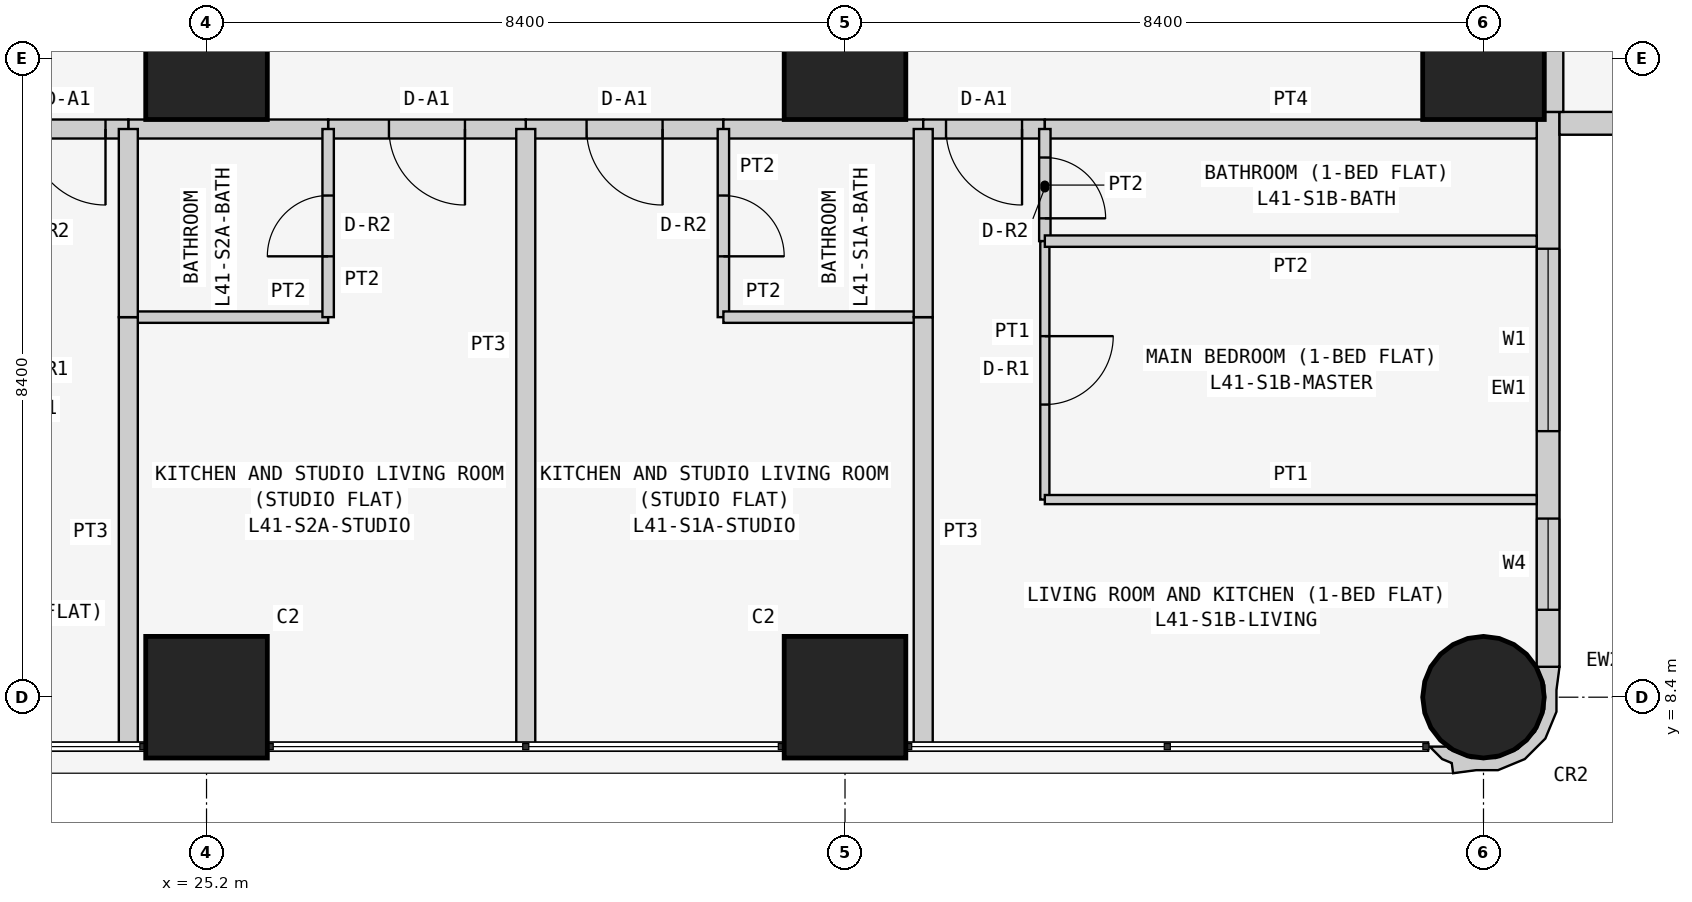
"""IFC4 building model, lengths in metres.
Left out: names, types, materials, properties, quantities, classifications, styles, units other than length and angle.
Written with IfcOpenShell. Run it as: python <this file> out.ifc"""

import sys

from ifc_helpers import new_model, si_unit, direction, frame, frame_2d, origin, origin_2d, place, context, subcontext, project, spatial, polyline, rectangle, circle, outline, extrude, element, fill, save


model = new_model("IFC4")
c1 = context("Model", 3, precision=1e-05, world=origin(), true_north=direction((0.0, 1.0)))
c2 = subcontext(c1, "Body", "Model", "MODEL_VIEW")
j1 = project(units=[si_unit("LENGTHUNIT", "METRE"), si_unit("PLANEANGLEUNIT", "RADIAN")], contexts=[c1])
p1 = place(None, origin())
s1 = spatial("IfcSite", under=j1, at=p1, CompositionType="ELEMENT")
p2 = place(p1, origin())
s2 = spatial("IfcBuilding", under=s1, at=p2, CompositionType="ELEMENT")
p3 = place(p2, frame((0.0, 0.0, 159.3)))
s3 = spatial("IfcBuildingStorey", under=s2, at=p3, CompositionType="ELEMENT", Elevation=159.3)
for number, where, z_axis, x_axis in (
    (1, (25.2, 8.4, 0.0), (0.0, 0.0, 1.0), (1.0, 0.0, 0.0)),
    (2, (25.2, 16.8, 0.0), (0.0, 0.0, 1.0), (1.0, 0.0, 0.0)),
    (3, (33.6, 8.4, 0.0), (0.0, 0.0, 1.0), (1.0, 0.0, 0.0)),
    (4, (33.6, 16.8, 0.0), (0.0, 0.0, 1.0), (1.0, 0.0, 0.0)),
):
    element("IfcColumn", number, at=place(p3, frame(where, z_axis=z_axis, x_axis=x_axis)), inside=s3, PredefinedType="COLUMN", context=c2, shape_type="SweptSolid", body=[
        extrude(rectangle(XDim=1.6, YDim=1.6, at=origin_2d()), origin(), (0.0, 0.0, 1.0), 3.6),
    ])
p4 = place(p3, frame((42.0, 8.4, 0.0), z_axis=(0.0, 0.0, 1.0), x_axis=(1.0, 0.0, 0.0)))
e5 = element("IfcColumn", 5, at=p4, inside=s3, PredefinedType="COLUMN", context=c2, shape_type="SweptSolid", body=[
    extrude(circle(Radius=0.8, at=origin_2d()), origin(), (0.0, 0.0, 1.0), 3.6),
])
p5 = place(p3, frame((42.0, 16.8, 0.0), z_axis=(0.0, 0.0, 1.0), x_axis=(1.0, 0.0, 0.0)))
e6 = element("IfcColumn", 6, at=p5, inside=s3, PredefinedType="COLUMN", context=c2, shape_type="SweptSolid", body=[
    extrude(rectangle(XDim=1.6, YDim=1.6, at=origin_2d()), origin(), (0.0, 0.0, 1.0), 3.6),
])
p6 = place(p3, frame((42.85, 8.8, 0.0), z_axis=(0.0, 0.0, 1.0), x_axis=(0.0, 1.0, 0.0)))
e7 = element("IfcWall", 7, at=p6, inside=s3, PredefinedType="SOLIDWALL", context=c2, shape_type="SweptSolid", body=[
    extrude(rectangle(XDim=7.3, YDim=0.3, at=frame_2d((3.65, 0.0))), origin(), (0.0, 0.0, 1.0), 3.45),
])
p7 = place(p6, frame((3.1, 0.0, 0.9)))
e8 = element("IfcOpeningElement", 8, at=p7, cuts=e7, PredefinedType="OPENING", context=c2, shape_type="SweptSolid", body=[
    extrude(rectangle(XDim=2.4, YDim=1.5, at=frame_2d((1.2, 0.75))), frame((0.0, 0.16, 0.0), z_axis=(0.0, -1.0, 0.0), x_axis=(1.0, 0.0, 0.0)), (0.0, 0.0, 1.0), 0.32),
])
p8 = place(p6, frame((0.75, 0.0, 0.9)))
e9 = element("IfcOpeningElement", 9, at=p8, cuts=e7, PredefinedType="OPENING", context=c2, shape_type="SweptSolid", body=[
    extrude(rectangle(XDim=1.2, YDim=1.5, at=frame_2d((0.6, 0.75))), frame((0.0, 0.16, 0.0), z_axis=(0.0, -1.0, 0.0), x_axis=(1.0, 0.0, 0.0)), (0.0, 0.0, 1.0), 0.32),
])
p9 = place(p3, frame((43.0, 15.95, 0.0), z_axis=(0.0, 0.0, 1.0), x_axis=(1.0, 0.0, 0.0)))
e10 = element("IfcWall", 10, at=p9, inside=s3, PredefinedType="SOLIDWALL", context=c2, shape_type="SweptSolid", body=[
    extrude(rectangle(XDim=15.4, YDim=0.3, at=frame_2d((7.7, 0.0))), origin(), (0.0, 0.0, 1.0), 3.45),
])
p10 = place(p9, frame((1.2, 0.0, 0.9)))
e11 = element("IfcOpeningElement", 11, at=p10, cuts=e10, PredefinedType="OPENING", context=c2, shape_type="SweptSolid", body=[
    extrude(rectangle(XDim=1.8, YDim=1.5, at=frame_2d((0.9, 0.75))), frame((0.0, 0.16, 0.0), z_axis=(0.0, -1.0, 0.0), x_axis=(1.0, 0.0, 0.0)), (0.0, 0.0, 1.0), 0.32),
])
p11 = place(p9, frame((4.95, 0.0, 1.5)))
e12 = element("IfcOpeningElement", 12, at=p11, cuts=e10, PredefinedType="OPENING", context=c2, shape_type="SweptSolid", body=[
    extrude(rectangle(XDim=0.9, YDim=0.7, at=frame_2d((0.45, 0.35))), frame((0.0, 0.16, 0.0), z_axis=(0.0, -1.0, 0.0), x_axis=(1.0, 0.0, 0.0)), (0.0, 0.0, 1.0), 0.32),
])
p12 = place(p9, frame((8.5, 0.0, 0.9)))
e13 = element("IfcOpeningElement", 13, at=p12, cuts=e10, PredefinedType="OPENING", context=c2, shape_type="SweptSolid", body=[
    extrude(rectangle(XDim=1.8, YDim=1.5, at=frame_2d((0.9, 0.75))), frame((0.0, 0.16, 0.0), z_axis=(0.0, -1.0, 0.0), x_axis=(1.0, 0.0, 0.0)), (0.0, 0.0, 1.0), 0.32),
])
p13 = place(p9, frame((12.5, 0.0, 0.0)))
e14 = element("IfcOpeningElement", 14, at=p13, cuts=e10, PredefinedType="OPENING", context=c2, shape_type="SweptSolid", body=[
    extrude(rectangle(XDim=0.9, YDim=2.4, at=frame_2d((0.45, 1.2))), frame((0.0, 0.16, 0.0), z_axis=(0.0, -1.0, 0.0), x_axis=(1.0, 0.0, 0.0)), (0.0, 0.0, 1.0), 0.32),
])
p14 = place(p9, frame((13.5, 0.0, 0.9)))
e15 = element("IfcOpeningElement", 15, at=p14, cuts=e10, PredefinedType="OPENING", context=c2, shape_type="SweptSolid", body=[
    extrude(rectangle(XDim=1.2, YDim=1.5, at=frame_2d((0.6, 0.75))), frame((0.0, 0.16, 0.0), z_axis=(0.0, -1.0, 0.0), x_axis=(1.0, 0.0, 0.0)), (0.0, 0.0, 1.0), 0.32),
])
p15 = place(p3, frame((41.352, 7.805, 0.0), z_axis=(0.0, 0.0, 1.0), x_axis=(0.343276641956, -0.93923434088, 0.0)))
e16 = element("IfcWall", 16, at=p15, inside=s3, PredefinedType="SOLIDWALL", context=c2, shape_type="SweptSolid", body=[
    extrude(outline(polyline([(-0.369, 1.89), (-0.509, 1.621), (-0.49, 1.615), (-0.479, 1.609), (-0.211, 1.62), (0.088, 1.511), (0.323, 1.295), (0.457, 1.006), (0.47, 0.688), (0.361, 0.389), (0.145, 0.154), (0.108, 0.136), (0.031, -0.075), (0.241, 0.023), (0.333, 0.124), (0.465, 0.094), (0.532, 0.393), (0.631, 0.663), (0.614, 1.044), (0.453, 1.391), (0.172, 1.649), (-0.097, 1.748), (-0.369, 1.89)])), origin(), (0.0, 0.0, 1.0), 3.45),
])
p16 = place(p3, frame((42.925, 22.571, 0.0), z_axis=(0.0, 0.0, 1.0), x_axis=(0.0, -1.0, 0.0)))
e17 = element("IfcWall", 17, at=p16, inside=s3, PredefinedType="PARTITIONING", context=c2, shape_type="SweptSolid", body=[
    extrude(rectangle(XDim=6.471, YDim=0.25, at=frame_2d((3.235, 0.0))), origin(), (0.0, 0.0, 1.0), 3.45),
])
p17 = place(p3, frame((32.0, 15.875, 0.0), z_axis=(0.0, 0.0, 1.0), x_axis=(-1.0, 0.0, 0.0)))
e18 = element("IfcWall", 18, at=p17, inside=s3, PredefinedType="PARTITIONING", context=c2, shape_type="SweptSolid", body=[
    extrude(rectangle(XDim=2.6, YDim=0.25, at=frame_2d((1.3, 0.0))), origin(), (0.0, 0.0, 1.0), 3.45),
])
p18 = place(p17, frame((0.8, 0.0, 0.0)))
e19 = element("IfcOpeningElement", 19, at=p18, cuts=e18, PredefinedType="OPENING", context=c2, shape_type="SweptSolid", body=[
    extrude(rectangle(XDim=1.0, YDim=2.1, at=frame_2d((0.5, 1.05))), frame((0.0, 0.135, 0.0), z_axis=(0.0, -1.0, 0.0), x_axis=(1.0, 0.0, 0.0)), (0.0, 0.0, 1.0), 0.27),
])
p19 = place(p3, frame((34.629, 15.875, 0.0), z_axis=(0.0, 0.0, 1.0), x_axis=(-1.0, 0.0, 0.0)))
e20 = element("IfcWall", 20, at=p19, inside=s3, PredefinedType="PARTITIONING", context=c2, shape_type="SweptSolid", body=[
    extrude(rectangle(XDim=2.629, YDim=0.25, at=frame_2d((1.314, 0.0))), origin(), (0.0, 0.0, 1.0), 3.45),
])
p20 = place(p3, frame((36.229, 15.875, 0.0), z_axis=(0.0, 0.0, 1.0), x_axis=(-1.0, 0.0, 0.0)))
e21 = element("IfcWall", 21, at=p20, inside=s3, PredefinedType="PARTITIONING", context=c2, shape_type="SweptSolid", body=[
    extrude(rectangle(XDim=1.6, YDim=0.25, at=frame_2d((0.8, 0.0))), origin(), (0.0, 0.0, 1.0), 3.45),
])
p21 = place(p20, frame((0.3, 0.0, 0.0)))
e22 = element("IfcOpeningElement", 22, at=p21, cuts=e21, PredefinedType="OPENING", context=c2, shape_type="SweptSolid", body=[
    extrude(rectangle(XDim=1.0, YDim=2.1, at=frame_2d((0.5, 1.05))), frame((0.0, 0.135, 0.0), z_axis=(0.0, -1.0, 0.0), x_axis=(1.0, 0.0, 0.0)), (0.0, 0.0, 1.0), 0.27),
])
p22 = place(p3, frame((42.7, 15.875, 0.0), z_axis=(0.0, 0.0, 1.0), x_axis=(-1.0, 0.0, 0.0)))
e23 = element("IfcWall", 23, at=p22, inside=s3, PredefinedType="PARTITIONING", context=c2, shape_type="SweptSolid", body=[
    extrude(rectangle(XDim=6.471, YDim=0.25, at=frame_2d((3.235, 0.0))), origin(), (0.0, 0.0, 1.0), 3.45),
])
p23 = place(p3, frame((29.4, 15.875, 0.0), z_axis=(0.0, 0.0, 1.0), x_axis=(-1.0, 0.0, 0.0)))
e24 = element("IfcWall", 24, at=p23, inside=s3, PredefinedType="PARTITIONING", context=c2, shape_type="SweptSolid", body=[
    extrude(rectangle(XDim=2.6, YDim=0.25, at=frame_2d((1.3, 0.0))), origin(), (0.0, 0.0, 1.0), 3.45),
])
p24 = place(p23, frame((0.8, 0.0, 0.0)))
e25 = element("IfcOpeningElement", 25, at=p24, cuts=e24, PredefinedType="OPENING", context=c2, shape_type="SweptSolid", body=[
    extrude(rectangle(XDim=1.0, YDim=2.1, at=frame_2d((0.5, 1.05))), frame((0.0, 0.135, 0.0), z_axis=(0.0, -1.0, 0.0), x_axis=(1.0, 0.0, 0.0)), (0.0, 0.0, 1.0), 0.27),
])
p25 = place(p3, frame((26.8, 15.875, 0.0), z_axis=(0.0, 0.0, 1.0), x_axis=(-1.0, 0.0, 0.0)))
e26 = element("IfcWall", 26, at=p25, inside=s3, PredefinedType="PARTITIONING", context=c2, shape_type="SweptSolid", body=[
    extrude(rectangle(XDim=2.629, YDim=0.25, at=frame_2d((1.314, 0.0))), origin(), (0.0, 0.0, 1.0), 3.45),
])
p26 = place(p3, frame((24.171, 15.875, 0.0), z_axis=(0.0, 0.0, 1.0), x_axis=(-1.0, 0.0, 0.0)))
e27 = element("IfcWall", 27, at=p26, inside=s3, PredefinedType="PARTITIONING", context=c2, shape_type="SweptSolid", body=[
    extrude(rectangle(XDim=1.6, YDim=0.25, at=frame_2d((0.8, 0.0))), origin(), (0.0, 0.0, 1.0), 3.45),
])
p27 = place(p26, frame((0.3, 0.0, 0.0)))
e28 = element("IfcOpeningElement", 28, at=p27, cuts=e27, PredefinedType="OPENING", context=c2, shape_type="SweptSolid", body=[
    extrude(rectangle(XDim=1.0, YDim=2.1, at=frame_2d((0.5, 1.05))), frame((0.0, 0.135, 0.0), z_axis=(0.0, -1.0, 0.0), x_axis=(1.0, 0.0, 0.0)), (0.0, 0.0, 1.0), 0.27),
])
p28 = place(p3, frame((32.0, 15.875, 0.0), z_axis=(0.0, 0.0, 1.0), x_axis=(0.0, -1.0, 0.0)))
e29 = element("IfcWall", 29, at=p28, inside=s3, PredefinedType="PARTITIONING", context=c2, shape_type="SweptSolid", body=[
    extrude(rectangle(XDim=2.475, YDim=0.15, at=frame_2d((1.238, 0.0))), origin(), (0.0, 0.0, 1.0), 3.45),
])
p29 = place(p28, frame((0.875, 0.0, 0.0)))
e30 = element("IfcOpeningElement", 30, at=p29, cuts=e29, PredefinedType="OPENING", context=c2, shape_type="SweptSolid", body=[
    extrude(rectangle(XDim=0.8, YDim=2.1, at=frame_2d((0.4, 1.05))), frame((0.0, 0.085, 0.0), z_axis=(0.0, -1.0, 0.0), x_axis=(1.0, 0.0, 0.0)), (0.0, 0.0, 1.0), 0.17),
])
p30 = place(p3, frame((32.0, 13.4, 0.0), z_axis=(0.0, 0.0, 1.0), x_axis=(1.0, 0.0, 0.0)))
e31 = element("IfcWall", 31, at=p30, inside=s3, PredefinedType="PARTITIONING", context=c2, shape_type="SweptSolid", body=[
    extrude(rectangle(XDim=2.629, YDim=0.15, at=frame_2d((1.314, 0.0))), origin(), (0.0, 0.0, 1.0), 3.45),
])
p31 = place(p3, frame((34.629, 13.4, 0.0), z_axis=(0.0, 0.0, 1.0), x_axis=(0.0, -1.0, 0.0)))
e32 = element("IfcWall", 32, at=p31, inside=s3, PredefinedType="PARTITIONING", context=c2, shape_type="SweptSolid", body=[
    extrude(rectangle(XDim=5.65, YDim=0.25, at=frame_2d((2.825, 0.0))), origin(), (0.0, 0.0, 1.0), 3.45),
])
p32 = place(p3, frame((29.4, 7.75, 0.0), z_axis=(0.0, 0.0, 1.0), x_axis=(0.0, 1.0, 0.0)))
e33 = element("IfcWall", 33, at=p32, inside=s3, PredefinedType="PARTITIONING", context=c2, shape_type="SweptSolid", body=[
    extrude(rectangle(XDim=8.125, YDim=0.25, at=frame_2d((4.062, 0.0))), origin(), (0.0, 0.0, 1.0), 2.848),
])
p33 = place(p3, frame((34.629, 13.4, 0.0), z_axis=(0.0, 0.0, 1.0), x_axis=(0.0, 1.0, 0.0)))
e34 = element("IfcWall", 34, at=p33, inside=s3, PredefinedType="PARTITIONING", context=c2, shape_type="SweptSolid", body=[
    extrude(rectangle(XDim=2.475, YDim=0.25, at=frame_2d((1.238, 0.0))), origin(), (0.0, 0.0, 1.0), 3.45),
])
p34 = place(p3, frame((36.229, 15.875, 0.0), z_axis=(0.0, 0.0, 1.0), x_axis=(0.0, -1.0, 0.0)))
e35 = element("IfcWall", 35, at=p34, inside=s3, PredefinedType="PARTITIONING", context=c2, shape_type="SweptSolid", body=[
    extrude(rectangle(XDim=1.475, YDim=0.15, at=frame_2d((0.738, 0.0))), origin(), (0.0, 0.0, 1.0), 3.45),
])
p35 = place(p34, frame((0.375, 0.0, 0.0)))
e36 = element("IfcOpeningElement", 36, at=p35, cuts=e35, PredefinedType="OPENING", context=c2, shape_type="SweptSolid", body=[
    extrude(rectangle(XDim=0.8, YDim=2.1, at=frame_2d((0.4, 1.05))), frame((0.0, 0.085, 0.0), z_axis=(0.0, -1.0, 0.0), x_axis=(1.0, 0.0, 0.0)), (0.0, 0.0, 1.0), 0.17),
])
p36 = place(p3, frame((36.229, 14.4, 0.0), z_axis=(0.0, 0.0, 1.0), x_axis=(0.0, -1.0, 0.0)))
e37 = element("IfcWall", 37, at=p36, inside=s3, PredefinedType="PARTITIONING", context=c2, shape_type="SweptSolid", body=[
    extrude(rectangle(XDim=3.4, YDim=0.12, at=frame_2d((1.7, 0.0))), origin(), (0.0, 0.0, 1.0), 3.45),
])
p37 = place(p36, frame((1.25, 0.0, 0.0)))
e38 = element("IfcOpeningElement", 38, at=p37, cuts=e37, PredefinedType="OPENING", context=c2, shape_type="SweptSolid", body=[
    extrude(rectangle(XDim=0.9, YDim=2.1, at=frame_2d((0.45, 1.05))), frame((0.0, 0.07, 0.0), z_axis=(0.0, -1.0, 0.0), x_axis=(1.0, 0.0, 0.0)), (0.0, 0.0, 1.0), 0.14),
])
p38 = place(p3, frame((36.229, 11.0, 0.0), z_axis=(0.0, 0.0, 1.0), x_axis=(1.0, 0.0, 0.0)))
e39 = element("IfcWall", 39, at=p38, inside=s3, PredefinedType="PARTITIONING", context=c2, shape_type="SweptSolid", body=[
    extrude(rectangle(XDim=6.471, YDim=0.12, at=frame_2d((3.235, 0.0))), origin(), (0.0, 0.0, 1.0), 3.45),
])
p39 = place(p3, frame((36.229, 14.4, 0.0), z_axis=(0.0, 0.0, 1.0), x_axis=(1.0, 0.0, 0.0)))
e40 = element("IfcWall", 40, at=p39, inside=s3, PredefinedType="PARTITIONING", context=c2, shape_type="SweptSolid", body=[
    extrude(rectangle(XDim=6.471, YDim=0.15, at=frame_2d((3.235, 0.0))), origin(), (0.0, 0.0, 1.0), 3.45),
])
p40 = place(p3, frame((24.171, 13.4, 0.0), z_axis=(0.0, 0.0, 1.0), x_axis=(1.0, 0.0, 0.0)))
e41 = element("IfcWall", 41, at=p40, inside=s3, PredefinedType="PARTITIONING", context=c2, shape_type="SweptSolid", body=[
    extrude(rectangle(XDim=2.629, YDim=0.15, at=frame_2d((1.314, 0.0))), origin(), (0.0, 0.0, 1.0), 3.45),
])
p41 = place(p3, frame((26.8, 13.4, 0.0), z_axis=(0.0, 0.0, 1.0), x_axis=(0.0, 1.0, 0.0)))
e42 = element("IfcWall", 42, at=p41, inside=s3, PredefinedType="PARTITIONING", context=c2, shape_type="SweptSolid", body=[
    extrude(rectangle(XDim=2.475, YDim=0.15, at=frame_2d((1.238, 0.0))), origin(), (0.0, 0.0, 1.0), 3.45),
])
p42 = place(p41, frame((0.8, 0.0, 0.0)))
e43 = element("IfcOpeningElement", 43, at=p42, cuts=e42, PredefinedType="OPENING", context=c2, shape_type="SweptSolid", body=[
    extrude(rectangle(XDim=0.8, YDim=2.1, at=frame_2d((0.4, 1.05))), frame((0.0, 0.085, 0.0), z_axis=(0.0, -1.0, 0.0), x_axis=(1.0, 0.0, 0.0)), (0.0, 0.0, 1.0), 0.17),
])
p43 = place(p3, frame((24.171, 7.75, 0.0), z_axis=(0.0, 0.0, 1.0), x_axis=(0.0, 1.0, 0.0)))
e44 = element("IfcWall", 44, at=p43, inside=s3, PredefinedType="PARTITIONING", context=c2, shape_type="SweptSolid", body=[
    extrude(rectangle(XDim=5.65, YDim=0.25, at=frame_2d((2.825, 0.0))), origin(), (0.0, 0.0, 1.0), 3.45),
])
p44 = place(p3, frame((24.171, 13.4, 0.0), z_axis=(0.0, 0.0, 1.0), x_axis=(0.0, 1.0, 0.0)))
e45 = element("IfcWall", 45, at=p44, inside=s3, PredefinedType="PARTITIONING", context=c2, shape_type="SweptSolid", body=[
    extrude(rectangle(XDim=2.475, YDim=0.25, at=frame_2d((1.238, 0.0))), origin(), (0.0, 0.0, 1.0), 3.45),
])
p45 = place(p7, origin())
e46 = element("IfcWindow", 46, at=p45, inside=s3, PartitioningType="SINGLE_PANEL", PredefinedType="WINDOW", context=c2, shape_type="SweptSolid", body=[
    extrude(rectangle(XDim=2.4, YDim=1.5, at=frame_2d((1.2, 0.75))), frame((0.0, 0.03, 0.0), z_axis=(0.0, -1.0, 0.0), x_axis=(1.0, 0.0, 0.0)), (0.0, 0.0, 1.0), 0.06),
])
fill(e8, e46)
p46 = place(p8, origin())
e47 = element("IfcWindow", 47, at=p46, inside=s3, PartitioningType="SINGLE_PANEL", PredefinedType="WINDOW", context=c2, shape_type="SweptSolid", body=[
    extrude(rectangle(XDim=1.2, YDim=1.5, at=frame_2d((0.6, 0.75))), frame((0.0, 0.03, 0.0), z_axis=(0.0, -1.0, 0.0), x_axis=(1.0, 0.0, 0.0)), (0.0, 0.0, 1.0), 0.06),
])
fill(e9, e47)
p47 = place(p18, origin())
e48 = element("IfcDoor", 48, at=p47, inside=s3, OperationType="SINGLE_SWING_LEFT", PredefinedType="DOOR", context=c2, shape_type="SweptSolid", body=[
    extrude(rectangle(XDim=1.0, YDim=2.1, at=frame_2d((0.5, 1.05))), frame((0.0, 0.025, 0.0), z_axis=(0.0, -1.0, 0.0), x_axis=(1.0, 0.0, 0.0)), (0.0, 0.0, 1.0), 0.05),
])
fill(e19, e48)
p48 = place(p29, origin())
e49 = element("IfcDoor", 49, at=p48, inside=s3, OperationType="SINGLE_SWING_RIGHT", PredefinedType="DOOR", context=c2, shape_type="SweptSolid", body=[
    extrude(rectangle(XDim=0.8, YDim=2.1, at=frame_2d((0.4, 1.05))), frame((0.0, 0.025, 0.0), z_axis=(0.0, -1.0, 0.0), x_axis=(1.0, 0.0, 0.0)), (0.0, 0.0, 1.0), 0.05),
])
fill(e30, e49)
p49 = place(p21, origin())
e50 = element("IfcDoor", 50, at=p49, inside=s3, OperationType="SINGLE_SWING_LEFT", PredefinedType="DOOR", context=c2, shape_type="SweptSolid", body=[
    extrude(rectangle(XDim=1.0, YDim=2.1, at=frame_2d((0.5, 1.05))), frame((0.0, 0.025, 0.0), z_axis=(0.0, -1.0, 0.0), x_axis=(1.0, 0.0, 0.0)), (0.0, 0.0, 1.0), 0.05),
])
fill(e22, e50)
p50 = place(p35, origin())
e51 = element("IfcDoor", 51, at=p50, inside=s3, OperationType="SINGLE_SWING_RIGHT", PredefinedType="DOOR", context=c2, shape_type="SweptSolid", body=[
    extrude(rectangle(XDim=0.8, YDim=2.1, at=frame_2d((0.4, 1.05))), frame((0.0, 0.025, 0.0), z_axis=(0.0, -1.0, 0.0), x_axis=(1.0, 0.0, 0.0)), (0.0, 0.0, 1.0), 0.05),
])
fill(e36, e51)
p51 = place(p37, origin())
e52 = element("IfcDoor", 52, at=p51, inside=s3, OperationType="SINGLE_SWING_LEFT", PredefinedType="DOOR", context=c2, shape_type="SweptSolid", body=[
    extrude(rectangle(XDim=0.9, YDim=2.1, at=frame_2d((0.45, 1.05))), frame((0.0, 0.025, 0.0), z_axis=(0.0, -1.0, 0.0), x_axis=(1.0, 0.0, 0.0)), (0.0, 0.0, 1.0), 0.05),
])
fill(e38, e52)
p52 = place(p24, origin())
e53 = element("IfcDoor", 53, at=p52, inside=s3, OperationType="SINGLE_SWING_LEFT", PredefinedType="DOOR", context=c2, shape_type="SweptSolid", body=[
    extrude(rectangle(XDim=1.0, YDim=2.1, at=frame_2d((0.5, 1.05))), frame((0.0, 0.025, 0.0), z_axis=(0.0, -1.0, 0.0), x_axis=(1.0, 0.0, 0.0)), (0.0, 0.0, 1.0), 0.05),
])
fill(e25, e53)
p53 = place(p42, origin())
e54 = element("IfcDoor", 54, at=p53, inside=s3, OperationType="SINGLE_SWING_LEFT", PredefinedType="DOOR", context=c2, shape_type="SweptSolid", body=[
    extrude(rectangle(XDim=0.8, YDim=2.1, at=frame_2d((0.4, 1.05))), frame((0.0, 0.025, 0.0), z_axis=(0.0, -1.0, 0.0), x_axis=(1.0, 0.0, 0.0)), (0.0, 0.0, 1.0), 0.05),
])
fill(e43, e54)
p54 = place(p27, origin())
e55 = element("IfcDoor", 55, at=p54, inside=s3, OperationType="SINGLE_SWING_LEFT", PredefinedType="DOOR", context=c2, shape_type="SweptSolid", body=[
    extrude(rectangle(XDim=1.0, YDim=2.1, at=frame_2d((0.5, 1.05))), frame((0.0, 0.025, 0.0), z_axis=(0.0, -1.0, 0.0), x_axis=(1.0, 0.0, 0.0)), (0.0, 0.0, 1.0), 0.05),
])
fill(e28, e55)
save(model, sys.argv[1])
